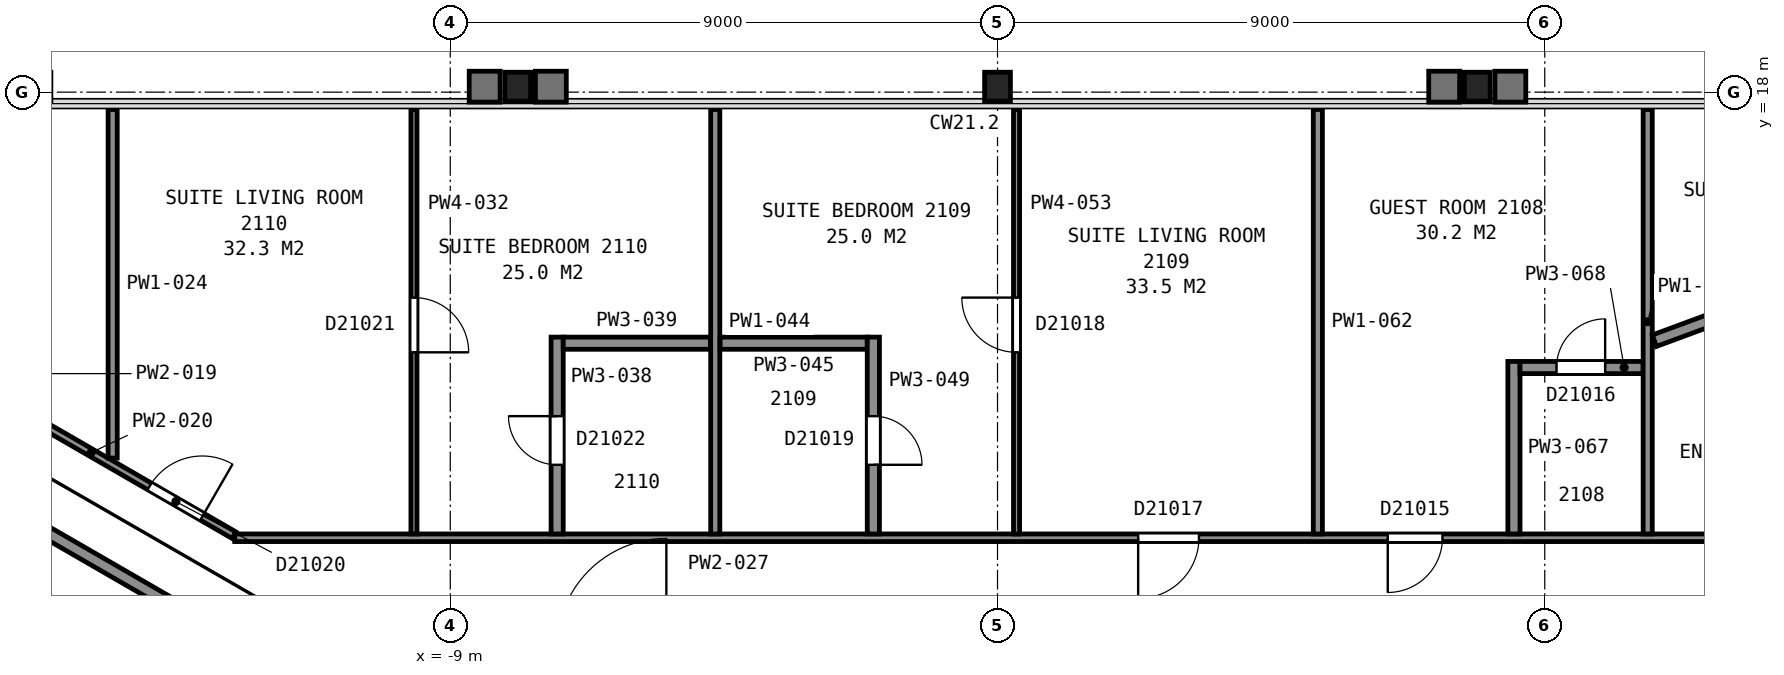
"""IFC4 building model, lengths in metres.
Left out: names, types, materials, properties, quantities, classifications, styles, units other than length and angle.
Written with IfcOpenShell. Run it as: python <this file> out.ifc"""

import sys

from ifc_helpers import new_model, si_unit, direction, frame, frame_2d, origin, origin_2d, place, context, subcontext, project, spatial, rectangle, i_section, extrude, element, fill, save


model = new_model("IFC4")
c1 = context("Model", 3, precision=1e-05, world=origin(), true_north=direction((0.0, 1.0)))
c2 = subcontext(c1, "Body", "Model", "MODEL_VIEW")
j1 = project(units=[si_unit("LENGTHUNIT", "METRE"), si_unit("PLANEANGLEUNIT", "RADIAN")], contexts=[c1])
p1 = place(None, origin())
s1 = spatial("IfcSite", under=j1, at=p1, CompositionType="ELEMENT")
p2 = place(p1, origin())
s2 = spatial("IfcBuilding", under=s1, at=p2, CompositionType="ELEMENT")
p3 = place(p2, frame((0.0, 0.0, 92.8)))
s3 = spatial("IfcBuildingStorey", under=s2, at=p3, CompositionType="ELEMENT", Elevation=92.8)
for number, where, z_axis, x_axis in (
    (1, (7.89, 18.09, 0.0), (0.0, 0.0, 1.0), (1.0, 0.0, 0.0)),
    (2, (0.0, 18.09, 0.0), (0.0, 0.0, 1.0), (1.0, 0.0, 0.0)),
    (3, (-7.89, 18.09, 0.0), (0.0, 0.0, 1.0), (1.0, 0.0, 0.0)),
):
    element("IfcColumn", number, at=place(p3, frame(where, z_axis=z_axis, x_axis=x_axis)), inside=s3, PredefinedType="COLUMN", context=c2, shape_type="SweptSolid", body=[
        extrude(i_section(OverallWidth=0.424, OverallDepth=0.475, WebThickness=0.048, FlangeThickness=0.077, FilletRadius=0.015, at=origin_2d()), origin(), (0.0, 0.0, 1.0), 3.6),
    ])
for number, where, z_axis, x_axis in (
    (4, (6.178, 5.299, 0.0), (0.0, 0.0, 1.0), (0.866, 0.5, 0.0)),
    (5, (-6.178, 5.299, 0.0), (0.0, 0.0, 1.0), (-0.866, 0.5, 0.0)),
):
    element("IfcWall", number, at=place(p3, frame(where, z_axis=z_axis, x_axis=x_axis)), inside=s3, PredefinedType="PARTITIONING", context=c2, shape_type="SweptSolid", body=[
        extrude(rectangle(XDim=12.0, YDim=0.2, at=frame_2d((6.0, 0.0))), origin(), (0.0, 0.0, 1.0), 3.35),
    ])
p4 = place(p3, frame((-15.867, 12.625, 0.0), z_axis=(0.0, 0.0, 1.0), x_axis=(0.86603035395, -0.499991425964, 0.0)))
e6 = element("IfcWall", 6, at=p4, inside=s3, PredefinedType="PARTITIONING", context=c2, shape_type="SweptSolid", body=[
    extrude(rectangle(XDim=3.824, YDim=0.125, at=frame_2d((1.912, 0.0))), origin(), (0.0, 0.0, 1.0), 2.613),
])
p5 = place(p4, frame((2.219, 0.0, 0.0)))
e7 = element("IfcOpeningElement", 7, at=p5, cuts=e6, PredefinedType="OPENING", context=c2, shape_type="SweptSolid", body=[
    extrude(rectangle(XDim=1.0, YDim=2.1, at=frame_2d((0.5, 1.05))), frame((0.0, 0.073, 0.0), z_axis=(0.0, -1.0, 0.0), x_axis=(1.0, 0.0, 0.0)), (0.0, 0.0, 1.0), 0.145),
])
p6 = place(p3, frame((-14.552, 11.981, 0.0), z_axis=(0.0, 0.0, 1.0), x_axis=(0.0, 1.0, 0.0)))
e8 = element("IfcWall", 8, at=p6, inside=s3, PredefinedType="PARTITIONING", context=c2, shape_type="SweptSolid", body=[
    extrude(rectangle(XDim=5.734, YDim=0.15, at=frame_2d((2.867, 0.0))), origin(), (0.0, 0.0, 1.0), 2.613),
])
p7 = place(p3, frame((-12.544, 10.671, 0.0), z_axis=(0.0, 0.0, 1.0), x_axis=(1.0, 0.0, 0.0)))
e9 = element("IfcWall", 9, at=p7, inside=s3, PredefinedType="PARTITIONING", context=c2, shape_type="SweptSolid", body=[
    extrude(rectangle(XDim=25.089, YDim=0.125, at=frame_2d((12.544, 0.0))), origin(), (0.0, 0.0, 1.0), 2.613),
])
p8 = place(p7, frame((18.962, 0.0, 0.0)))
e10 = element("IfcOpeningElement", 10, at=p8, cuts=e9, PredefinedType="OPENING", context=c2, shape_type="SweptSolid", body=[
    extrude(rectangle(XDim=0.9, YDim=2.1, at=frame_2d((0.45, 1.05))), frame((0.0, 0.073, 0.0), z_axis=(0.0, -1.0, 0.0), x_axis=(1.0, 0.0, 0.0)), (0.0, 0.0, 1.0), 0.145),
])
p9 = place(p7, frame((14.857, 0.0, 0.0)))
e11 = element("IfcOpeningElement", 11, at=p9, cuts=e9, PredefinedType="OPENING", context=c2, shape_type="SweptSolid", body=[
    extrude(rectangle(XDim=1.0, YDim=2.1, at=frame_2d((0.5, 1.05))), frame((0.0, 0.073, 0.0), z_axis=(0.0, -1.0, 0.0), x_axis=(1.0, 0.0, 0.0)), (0.0, 0.0, 1.0), 0.145),
])
p10 = place(p3, frame((-9.597, 17.715, 0.0), z_axis=(0.0, 0.0, 1.0), x_axis=(0.0, -1.0, 0.0)))
e12 = element("IfcWall", 12, at=p10, inside=s3, PredefinedType="PARTITIONING", context=c2, shape_type="SweptSolid", body=[
    extrude(rectangle(XDim=6.982, YDim=0.1, at=frame_2d((3.491, 0.0))), origin(), (0.0, 0.0, 1.0), 2.613),
])
p11 = place(p10, frame((3.094, 0.0, 0.0)))
e13 = element("IfcOpeningElement", 13, at=p11, cuts=e12, PredefinedType="OPENING", context=c2, shape_type="SweptSolid", body=[
    extrude(rectangle(XDim=0.9, YDim=2.1, at=frame_2d((0.45, 1.05))), frame((0.0, 0.06, 0.0), z_axis=(0.0, -1.0, 0.0), x_axis=(1.0, 0.0, 0.0)), (0.0, 0.0, 1.0), 0.12),
])
p12 = place(p3, frame((-7.242, 13.971, 0.0), z_axis=(0.0, 0.0, 1.0), x_axis=(0.0, -1.0, 0.0)))
e14 = element("IfcWall", 14, at=p12, inside=s3, PredefinedType="PARTITIONING", context=c2, shape_type="SweptSolid", body=[
    extrude(rectangle(XDim=3.238, YDim=0.2, at=frame_2d((1.619, 0.0))), origin(), (0.0, 0.0, 1.0), 2.613),
])
p13 = place(p12, frame((1.3, 0.0, 0.0)))
e15 = element("IfcOpeningElement", 15, at=p13, cuts=e14, PredefinedType="OPENING", context=c2, shape_type="SweptSolid", body=[
    extrude(rectangle(XDim=0.8, YDim=2.1, at=frame_2d((0.4, 1.05))), frame((0.0, 0.11, 0.0), z_axis=(0.0, -1.0, 0.0), x_axis=(1.0, 0.0, 0.0)), (0.0, 0.0, 1.0), 0.22),
])
p14 = place(p3, frame((-7.142, 13.871, 0.0), z_axis=(0.0, 0.0, 1.0), x_axis=(1.0, 0.0, 0.0)))
e16 = element("IfcWall", 16, at=p14, inside=s3, PredefinedType="PARTITIONING", context=c2, shape_type="SweptSolid", body=[
    extrude(rectangle(XDim=2.42, YDim=0.2, at=frame_2d((1.21, 0.0))), origin(), (0.0, 0.0, 1.0), 2.613),
])
p15 = place(p3, frame((-4.642, 10.733, 0.0), z_axis=(0.0, 0.0, 1.0), x_axis=(0.0, 1.0, 0.0)))
e17 = element("IfcWall", 17, at=p15, inside=s3, PredefinedType="PARTITIONING", context=c2, shape_type="SweptSolid", body=[
    extrude(rectangle(XDim=6.982, YDim=0.15, at=frame_2d((3.491, 0.0))), origin(), (0.0, 0.0, 1.0), 2.613),
])
p16 = place(p3, frame((-4.562, 13.871, 0.0), z_axis=(0.0, 0.0, 1.0), x_axis=(1.0, 0.0, 0.0)))
e18 = element("IfcWall", 18, at=p16, inside=s3, PredefinedType="PARTITIONING", context=c2, shape_type="SweptSolid", body=[
    extrude(rectangle(XDim=2.42, YDim=0.2, at=frame_2d((1.21, 0.0))), origin(), (0.0, 0.0, 1.0), 2.613),
])
p17 = place(p3, frame((-2.042, 10.733, 0.0), z_axis=(0.0, 0.0, 1.0), x_axis=(0.0, 1.0, 0.0)))
e19 = element("IfcWall", 19, at=p17, inside=s3, PredefinedType="PARTITIONING", context=c2, shape_type="SweptSolid", body=[
    extrude(rectangle(XDim=3.238, YDim=0.2, at=frame_2d((1.619, 0.0))), origin(), (0.0, 0.0, 1.0), 2.613),
])
p18 = place(p17, frame((1.137, 0.0, 0.0)))
e20 = element("IfcOpeningElement", 20, at=p18, cuts=e19, PredefinedType="OPENING", context=c2, shape_type="SweptSolid", body=[
    extrude(rectangle(XDim=0.8, YDim=2.1, at=frame_2d((0.4, 1.05))), frame((0.0, 0.11, 0.0), z_axis=(0.0, -1.0, 0.0), x_axis=(1.0, 0.0, 0.0)), (0.0, 0.0, 1.0), 0.22),
])
p19 = place(p3, frame((0.313, 10.733, 0.0), z_axis=(0.0, 0.0, 1.0), x_axis=(0.0, 1.0, 0.0)))
e21 = element("IfcWall", 21, at=p19, inside=s3, PredefinedType="PARTITIONING", context=c2, shape_type="SweptSolid", body=[
    extrude(rectangle(XDim=6.982, YDim=0.1, at=frame_2d((3.491, 0.0))), origin(), (0.0, 0.0, 1.0), 2.613),
])
p20 = place(p19, frame((2.988, 0.0, 0.0)))
e22 = element("IfcOpeningElement", 22, at=p20, cuts=e21, PredefinedType="OPENING", context=c2, shape_type="SweptSolid", body=[
    extrude(rectangle(XDim=0.9, YDim=2.1, at=frame_2d((0.45, 1.05))), frame((0.0, 0.06, 0.0), z_axis=(0.0, -1.0, 0.0), x_axis=(1.0, 0.0, 0.0)), (0.0, 0.0, 1.0), 0.12),
])
p21 = place(p3, frame((5.268, 10.733, 0.0), z_axis=(0.0, 0.0, 1.0), x_axis=(0.0, 1.0, 0.0)))
e23 = element("IfcWall", 23, at=p21, inside=s3, PredefinedType="PARTITIONING", context=c2, shape_type="SweptSolid", body=[
    extrude(rectangle(XDim=6.982, YDim=0.15, at=frame_2d((3.491, 0.0))), origin(), (0.0, 0.0, 1.0), 2.613),
])
p22 = place(p3, frame((8.493, 10.733, 0.0), z_axis=(0.0, 0.0, 1.0), x_axis=(0.0, 1.0, 0.0)))
e24 = element("IfcWall", 24, at=p22, inside=s3, PredefinedType="PARTITIONING", context=c2, shape_type="SweptSolid", body=[
    extrude(rectangle(XDim=2.838, YDim=0.2, at=frame_2d((1.419, 0.0))), origin(), (0.0, 0.0, 1.0), 2.613),
])
p23 = place(p3, frame((10.618, 13.471, 0.0), z_axis=(0.0, 0.0, 1.0), x_axis=(-1.0, 0.0, 0.0)))
e25 = element("IfcWall", 25, at=p23, inside=s3, PredefinedType="PARTITIONING", context=c2, shape_type="SweptSolid", body=[
    extrude(rectangle(XDim=2.025, YDim=0.2, at=frame_2d((1.012, 0.0))), origin(), (0.0, 0.0, 1.0), 2.613),
])
p24 = place(p23, frame((0.625, 0.0, 0.0)))
e26 = element("IfcOpeningElement", 26, at=p24, cuts=e25, PredefinedType="OPENING", context=c2, shape_type="SweptSolid", body=[
    extrude(rectangle(XDim=0.8, YDim=2.1, at=frame_2d((0.4, 1.05))), frame((0.0, 0.11, 0.0), z_axis=(0.0, -1.0, 0.0), x_axis=(1.0, 0.0, 0.0)), (0.0, 0.0, 1.0), 0.22),
])
p25 = place(p3, frame((10.693, 10.733, 0.0), z_axis=(0.0, 0.0, 1.0), x_axis=(0.0, 1.0, 0.0)))
e27 = element("IfcWall", 27, at=p25, inside=s3, PredefinedType="PARTITIONING", context=c2, shape_type="SweptSolid", body=[
    extrude(rectangle(XDim=6.982, YDim=0.15, at=frame_2d((3.491, 0.0))), origin(), (0.0, 0.0, 1.0), 2.613),
])
p26 = place(p3, frame((10.803, 13.912, 0.0), z_axis=(0.0, 0.0, 1.0), x_axis=(0.937732337139, 0.347358696283, 0.0)))
e28 = element("IfcWall", 28, at=p26, inside=s3, PredefinedType="PARTITIONING", context=c2, shape_type="SweptSolid", body=[
    extrude(rectangle(XDim=2.51, YDim=0.2, at=frame_2d((1.255, 0.0))), origin(), (0.0, 0.0, 1.0), 2.613),
])
p27 = place(p5, origin())
e29 = element("IfcDoor", 29, at=p27, inside=s3, OperationType="SINGLE_SWING_RIGHT", PredefinedType="DOOR", context=c2, shape_type="SweptSolid", body=[
    extrude(rectangle(XDim=1.0, YDim=2.1, at=frame_2d((0.5, 1.05))), frame((0.0, 0.025, 0.0), z_axis=(0.0, -1.0, 0.0), x_axis=(1.0, 0.0, 0.0)), (0.0, 0.0, 1.0), 0.05),
])
fill(e7, e29)
p28 = place(p8, origin())
e30 = element("IfcDoor", 30, at=p28, inside=s3, OperationType="SINGLE_SWING_LEFT", PredefinedType="DOOR", context=c2, shape_type="SweptSolid", body=[
    extrude(rectangle(XDim=0.9, YDim=2.1, at=frame_2d((0.45, 1.05))), frame((0.0, 0.025, 0.0), z_axis=(0.0, -1.0, 0.0), x_axis=(1.0, 0.0, 0.0)), (0.0, 0.0, 1.0), 0.05),
])
fill(e10, e30)
p29 = place(p9, origin())
e31 = element("IfcDoor", 31, at=p29, inside=s3, OperationType="SINGLE_SWING_LEFT", PredefinedType="DOOR", context=c2, shape_type="SweptSolid", body=[
    extrude(rectangle(XDim=1.0, YDim=2.1, at=frame_2d((0.5, 1.05))), frame((0.0, 0.025, 0.0), z_axis=(0.0, -1.0, 0.0), x_axis=(1.0, 0.0, 0.0)), (0.0, 0.0, 1.0), 0.05),
])
fill(e11, e31)
p30 = place(p11, origin())
e32 = element("IfcDoor", 32, at=p30, inside=s3, OperationType="SINGLE_SWING_RIGHT", PredefinedType="DOOR", context=c2, shape_type="SweptSolid", body=[
    extrude(rectangle(XDim=0.9, YDim=2.1, at=frame_2d((0.45, 1.05))), frame((0.0, 0.025, 0.0), z_axis=(0.0, -1.0, 0.0), x_axis=(1.0, 0.0, 0.0)), (0.0, 0.0, 1.0), 0.05),
])
fill(e13, e32)
p31 = place(p13, origin())
e33 = element("IfcDoor", 33, at=p31, inside=s3, OperationType="SINGLE_SWING_LEFT", PredefinedType="DOOR", context=c2, shape_type="SweptSolid", body=[
    extrude(rectangle(XDim=0.8, YDim=2.1, at=frame_2d((0.4, 1.05))), frame((0.0, 0.025, 0.0), z_axis=(0.0, -1.0, 0.0), x_axis=(1.0, 0.0, 0.0)), (0.0, 0.0, 1.0), 0.05),
])
fill(e15, e33)
p32 = place(p18, origin())
e34 = element("IfcDoor", 34, at=p32, inside=s3, OperationType="SINGLE_SWING_LEFT", PredefinedType="DOOR", context=c2, shape_type="SweptSolid", body=[
    extrude(rectangle(XDim=0.8, YDim=2.1, at=frame_2d((0.4, 1.05))), frame((0.0, 0.025, 0.0), z_axis=(0.0, -1.0, 0.0), x_axis=(1.0, 0.0, 0.0)), (0.0, 0.0, 1.0), 0.05),
])
fill(e20, e34)
p33 = place(p20, origin())
e35 = element("IfcDoor", 35, at=p33, inside=s3, OperationType="SINGLE_SWING_RIGHT", PredefinedType="DOOR", context=c2, shape_type="SweptSolid", body=[
    extrude(rectangle(XDim=0.9, YDim=2.1, at=frame_2d((0.45, 1.05))), frame((0.0, 0.025, 0.0), z_axis=(0.0, -1.0, 0.0), x_axis=(1.0, 0.0, 0.0)), (0.0, 0.0, 1.0), 0.05),
])
fill(e22, e35)
p34 = place(p24, origin())
e36 = element("IfcDoor", 36, at=p34, inside=s3, OperationType="SINGLE_SWING_LEFT", PredefinedType="DOOR", context=c2, shape_type="SweptSolid", body=[
    extrude(rectangle(XDim=0.8, YDim=2.1, at=frame_2d((0.4, 1.05))), frame((0.0, 0.025, 0.0), z_axis=(0.0, -1.0, 0.0), x_axis=(1.0, 0.0, 0.0)), (0.0, 0.0, 1.0), 0.05),
])
fill(e26, e36)
save(model, sys.argv[1])
